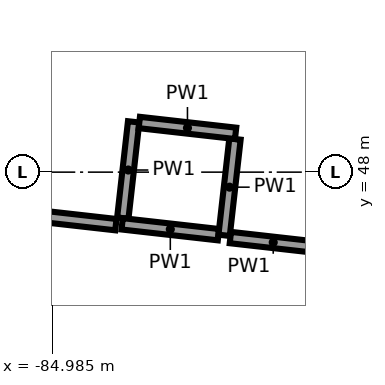
"""IFC4 building model, lengths in metres.
Left out: names, types, materials, properties, quantities, classifications, styles, units other than length and angle.
Written with IfcOpenShell. Run it as: python <this file> out.ifc"""

import sys

from ifc_helpers import new_model, si_unit, direction, frame, frame_2d, origin, place, context, subcontext, project, spatial, rectangle, extrude, element, save


model = new_model("IFC4")
c1 = context("Model", 3, precision=1e-05, world=origin(), true_north=direction((0.0, 1.0)))
c2 = subcontext(c1, "Body", "Model", "MODEL_VIEW")
j1 = project(units=[si_unit("LENGTHUNIT", "METRE"), si_unit("PLANEANGLEUNIT", "RADIAN")], contexts=[c1])
p1 = place(None, origin())
s1 = spatial("IfcSite", under=j1, at=p1, CompositionType="ELEMENT")
p2 = place(p1, origin())
s2 = spatial("IfcBuilding", under=s1, at=p2, CompositionType="ELEMENT")
p3 = place(p2, frame((0.0, 0.0, 18.0)))
s3 = spatial("IfcBuildingStorey", under=s2, at=p3, CompositionType="ELEMENT", Elevation=18.0)
for number, where, z_axis, x_axis in (
    (1, (-83.913, 48.662, 0.0), (0.0, 0.0, 1.0), (-0.112, -0.994, 0.0)),
    (2, (-84.064, 47.32, 0.0), (0.0, 0.0, 1.0), (0.994, -0.112, 0.0)),
):
    element("IfcWall", number, at=place(p3, frame(where, z_axis=z_axis, x_axis=x_axis)), inside=s3, PredefinedType="PARTITIONING", context=c2, shape_type="SweptSolid", body=[
        extrude(rectangle(XDim=1.275, YDim=0.15, at=frame_2d((0.638, 0.0))), origin(), (0.0, 0.0, 1.0), 5.6),
    ])
for number, where, z_axis, x_axis in (
    (3, (-82.723, 47.169, 0.0), (0.0, 0.0, 1.0), (0.112, 0.994, 0.0)),
    (4, (-82.572, 48.51, 0.0), (0.0, 0.0, 1.0), (-0.994, 0.112, 0.0)),
):
    element("IfcWall", number, at=place(p3, frame(where, z_axis=z_axis, x_axis=x_axis)), inside=s3, PredefinedType="PARTITIONING", context=c2, shape_type="SweptSolid", body=[
        extrude(rectangle(XDim=1.275, YDim=0.15, at=frame_2d((0.637, 0.0))), origin(), (0.0, 0.0, 1.0), 5.6),
    ])
p4 = place(p3, frame((-82.641, 47.139, 0.0), z_axis=(0.0, 0.0, 1.0), x_axis=(0.993722649229, -0.111871785581, 0.0)))
e5 = element("IfcWall", 5, at=p4, inside=s3, PredefinedType="PARTITIONING", context=c2, shape_type="SweptSolid", body=[
    extrude(rectangle(XDim=1.135, YDim=0.15, at=frame_2d((0.567, 0.0))), origin(), (0.0, 0.0, 1.0), 5.6),
])
p5 = place(p3, frame((-87.827, 47.724, 0.0), z_axis=(0.0, 0.0, 1.0), x_axis=(0.993708869306, -0.11199412066, 0.0)))
e6 = element("IfcWall", 6, at=p5, inside=s3, PredefinedType="PARTITIONING", context=c2, shape_type="SweptSolid", body=[
    extrude(rectangle(XDim=3.704, YDim=0.15, at=frame_2d((1.852, 0.0))), origin(), (0.0, 0.0, 1.0), 4.5),
])
p6 = place(p5, frame((0.65, 0.0, 0.0)))
e7 = element("IfcOpeningElement", 7, at=p6, cuts=e6, PredefinedType="OPENING", context=c2, shape_type="SweptSolid", body=[
    extrude(rectangle(XDim=1.8, YDim=2.1, at=frame_2d((0.9, 1.05))), frame((0.0, 0.085, 0.0), z_axis=(0.0, -1.0, 0.0), x_axis=(1.0, 0.0, 0.0)), (0.0, 0.0, 1.0), 0.17),
])
save(model, sys.argv[1])
